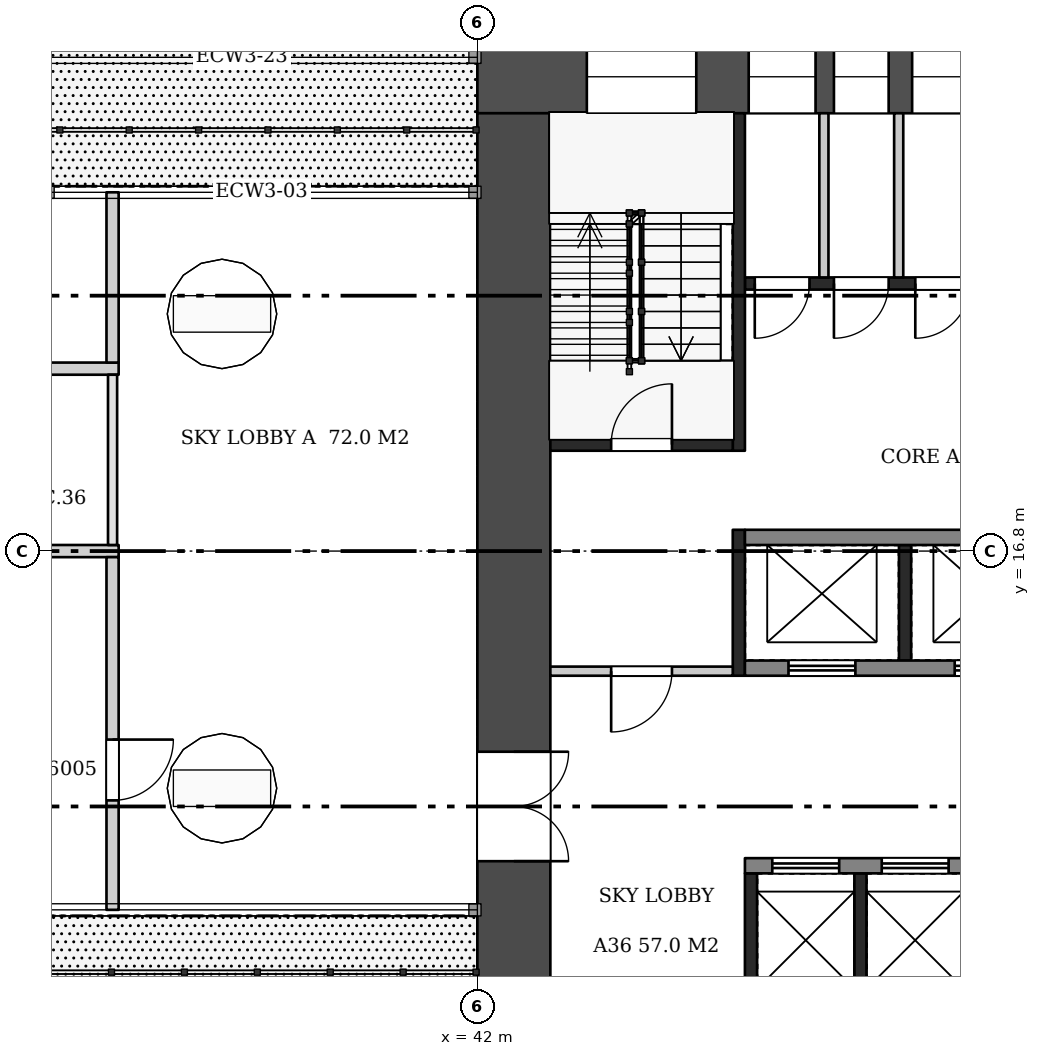
"""IFC4 building model, lengths in metres.
Left out: names, types, materials, properties, quantities, classifications, styles, units other than length and angle.
Written with IfcOpenShell. Run it as: python <this file> out.ifc"""

import sys

from ifc_helpers import new_model, si_unit, direction, frame, frame_2d, origin, place, context, subcontext, project, spatial, rectangle, extrude, element, fill, save


model = new_model("IFC4")
c1 = context("Model", 3, precision=1e-05, world=origin(), true_north=direction((0.0, 1.0)))
c2 = subcontext(c1, "Body", "Model", "MODEL_VIEW")
j1 = project(units=[si_unit("LENGTHUNIT", "METRE"), si_unit("PLANEANGLEUNIT", "RADIAN")], contexts=[c1])
p1 = place(None, origin())
s1 = spatial("IfcSite", under=j1, at=p1, CompositionType="ELEMENT")
p2 = place(p1, origin())
s2 = spatial("IfcBuilding", under=s1, at=p2, CompositionType="ELEMENT")
p3 = place(p2, frame((0.0, 0.0, 140.7)))
s3 = spatial("IfcBuildingStorey", under=s2, at=p3, CompositionType="ELEMENT", Elevation=140.7)
p4 = place(p3, frame((42.0, 24.6, 0.0), z_axis=(0.0, 0.0, 1.0), x_axis=(1.0, 0.0, 0.0)))
e1 = element("IfcWall", 1, at=p4, inside=s3, PredefinedType="SHEAR", context=c2, shape_type="SweptSolid", body=[
    extrude(rectangle(XDim=16.8, YDim=1.2, at=frame_2d((8.4, 0.0))), origin(), (0.0, 0.0, 1.0), 6.72),
])
p5 = place(p4, frame((1.8, 0.0, 0.5)))
e2 = element("IfcOpeningElement", 2, at=p5, cuts=e1, PredefinedType="OPENING", context=c2, shape_type="SweptSolid", body=[
    extrude(rectangle(XDim=1.8, YDim=2.4, at=frame_2d((0.9, 1.2))), frame((0.0, 0.61, 0.0), z_axis=(0.0, -1.0, 0.0), x_axis=(1.0, 0.0, 0.0)), (0.0, 0.0, 1.0), 1.22),
])
p6 = place(p4, frame((4.462, 0.0, 1.6)))
e3 = element("IfcOpeningElement", 3, at=p6, cuts=e1, PredefinedType="OPENING", context=c2, shape_type="SweptSolid", body=[
    extrude(rectangle(XDim=1.1, YDim=1.2, at=frame_2d((0.55, 0.6))), frame((0.0, 0.61, 0.0), z_axis=(0.0, -1.0, 0.0), x_axis=(1.0, 0.0, 0.0)), (0.0, 0.0, 1.0), 1.22),
])
p7 = place(p4, frame((5.864, 0.0, 1.6)))
e4 = element("IfcOpeningElement", 4, at=p7, cuts=e1, PredefinedType="OPENING", context=c2, shape_type="SweptSolid", body=[
    extrude(rectangle(XDim=0.9, YDim=1.2, at=frame_2d((0.45, 0.6))), frame((0.0, 0.61, 0.0), z_axis=(0.0, -1.0, 0.0), x_axis=(1.0, 0.0, 0.0)), (0.0, 0.0, 1.0), 1.22),
])
p8 = place(p4, frame((7.15, 0.0, 1.6)))
e5 = element("IfcOpeningElement", 5, at=p8, cuts=e1, PredefinedType="OPENING", context=c2, shape_type="SweptSolid", body=[
    extrude(rectangle(XDim=1.1, YDim=1.2, at=frame_2d((0.55, 0.6))), frame((0.0, 0.61, 0.0), z_axis=(0.0, -1.0, 0.0), x_axis=(1.0, 0.0, 0.0)), (0.0, 0.0, 1.0), 1.22),
])
p9 = place(p4, frame((12.65, 0.0, 0.6)))
e6 = element("IfcOpeningElement", 6, at=p9, cuts=e1, PredefinedType="OPENING", context=c2, shape_type="SweptSolid", body=[
    extrude(rectangle(XDim=1.0, YDim=2.1, at=frame_2d((0.5, 1.05))), frame((0.0, 0.61, 0.0), z_axis=(0.0, -1.0, 0.0), x_axis=(1.0, 0.0, 0.0)), (0.0, 0.0, 1.0), 1.22),
])
p10 = place(p4, frame((14.175, 0.0, 1.6)))
e7 = element("IfcOpeningElement", 7, at=p10, cuts=e1, PredefinedType="OPENING", context=c2, shape_type="SweptSolid", body=[
    extrude(rectangle(XDim=1.2, YDim=1.2, at=frame_2d((0.6, 0.6))), frame((0.0, 0.61, 0.0), z_axis=(0.0, -1.0, 0.0), x_axis=(1.0, 0.0, 0.0)), (0.0, 0.0, 1.0), 1.22),
])
p11 = place(p3, frame((42.6, 9.6, 0.0), z_axis=(0.0, 0.0, 1.0), x_axis=(0.0, 1.0, 0.0)))
e8 = element("IfcWall", 8, at=p11, inside=s3, PredefinedType="SHEAR", context=c2, shape_type="SweptSolid", body=[
    extrude(rectangle(XDim=14.4, YDim=1.2, at=frame_2d((7.2, 0.0))), origin(), (0.0, 0.0, 1.0), 6.72),
])
p12 = place(p11, frame((2.1, 0.0, 0.0)))
e9 = element("IfcOpeningElement", 9, at=p12, cuts=e8, PredefinedType="OPENING", context=c2, shape_type="SweptSolid", body=[
    extrude(rectangle(XDim=1.8, YDim=2.1, at=frame_2d((0.9, 1.05))), frame((0.0, 0.61, 0.0), z_axis=(0.0, -1.0, 0.0), x_axis=(1.0, 0.0, 0.0)), (0.0, 0.0, 1.0), 1.22),
])
for number, where, z_axis, x_axis in (
    (10, (46.5, 9.6, 0.0), (0.0, 0.0, 1.0), (0.0, 1.0, 0.0)),
    (11, (48.3, 9.6, 0.0), (0.0, 0.0, 1.0), (0.0, 1.0, 0.0)),
):
    element("IfcWall", number, at=place(p3, frame(where, z_axis=z_axis, x_axis=x_axis)), inside=s3, PredefinedType="SHEAR", context=c2, shape_type="SweptSolid", body=[
        extrude(rectangle(XDim=1.9, YDim=0.2, at=frame_2d((0.95, 0.0))), origin(), (0.0, 0.0, 1.0), 6.72),
    ])
p13 = place(p3, frame((46.4, 11.625, 0.0), z_axis=(0.0, 0.0, 1.0), x_axis=(1.0, 0.0, 0.0)))
e12 = element("IfcWall", 12, at=p13, inside=s3, PredefinedType="SHEAR", context=c2, shape_type="SweptSolid", body=[
    extrude(rectangle(XDim=8.0, YDim=0.25, at=frame_2d((4.0, 0.0))), origin(), (0.0, 0.0, 1.0), 6.72),
])
p14 = place(p13, frame((0.45, 0.0, 0.0)))
e13 = element("IfcOpeningElement", 13, at=p14, cuts=e12, PredefinedType="OPENING", context=c2, shape_type="SweptSolid", body=[
    extrude(rectangle(XDim=1.1, YDim=2.1, at=frame_2d((0.55, 1.05))), frame((0.0, 0.135, 0.0), z_axis=(0.0, -1.0, 0.0), x_axis=(1.0, 0.0, 0.0)), (0.0, 0.0, 1.0), 0.27),
])
p15 = place(p13, frame((2.25, 0.0, 0.0)))
e14 = element("IfcOpeningElement", 14, at=p15, cuts=e12, PredefinedType="OPENING", context=c2, shape_type="SweptSolid", body=[
    extrude(rectangle(XDim=1.1, YDim=2.1, at=frame_2d((0.55, 1.05))), frame((0.0, 0.135, 0.0), z_axis=(0.0, -1.0, 0.0), x_axis=(1.0, 0.0, 0.0)), (0.0, 0.0, 1.0), 0.27),
])
p16 = place(p13, frame((4.05, 0.0, 0.0)))
e15 = element("IfcOpeningElement", 15, at=p16, cuts=e12, PredefinedType="OPENING", context=c2, shape_type="SweptSolid", body=[
    extrude(rectangle(XDim=1.1, YDim=2.1, at=frame_2d((0.55, 1.05))), frame((0.0, 0.135, 0.0), z_axis=(0.0, -1.0, 0.0), x_axis=(1.0, 0.0, 0.0)), (0.0, 0.0, 1.0), 0.27),
])
p17 = place(p13, frame((5.581, 0.0, 0.0)))
e16 = element("IfcOpeningElement", 16, at=p17, cuts=e12, PredefinedType="OPENING", context=c2, shape_type="SweptSolid", body=[
    extrude(rectangle(XDim=0.9, YDim=2.1, at=frame_2d((0.45, 1.05))), frame((0.0, 0.135, 0.0), z_axis=(0.0, -1.0, 0.0), x_axis=(1.0, 0.0, 0.0)), (0.0, 0.0, 1.0), 0.27),
])
p18 = place(p13, frame((6.756, 0.0, 0.0)))
e17 = element("IfcOpeningElement", 17, at=p18, cuts=e12, PredefinedType="OPENING", context=c2, shape_type="SweptSolid", body=[
    extrude(rectangle(XDim=0.9, YDim=2.1, at=frame_2d((0.45, 1.05))), frame((0.0, 0.135, 0.0), z_axis=(0.0, -1.0, 0.0), x_axis=(1.0, 0.0, 0.0)), (0.0, 0.0, 1.0), 0.27),
])
p19 = place(p3, frame((49.033, 15.0, 0.0), z_axis=(0.0, 0.0, 1.0), x_axis=(0.0, 1.0, 0.0)))
e18 = element("IfcWall", 18, at=p19, inside=s3, PredefinedType="SHEAR", context=c2, shape_type="SweptSolid", body=[
    extrude(rectangle(XDim=1.9, YDim=0.2, at=frame_2d((0.95, 0.0))), origin(), (0.0, 0.0, 1.0), 6.72),
])
p20 = place(p3, frame((46.4, 14.875, 0.0), z_axis=(0.0, 0.0, 1.0), x_axis=(1.0, 0.0, 0.0)))
e19 = element("IfcWall", 19, at=p20, inside=s3, PredefinedType="SHEAR", context=c2, shape_type="SweptSolid", body=[
    extrude(rectangle(XDim=8.0, YDim=0.25, at=frame_2d((4.0, 0.0))), origin(), (0.0, 0.0, 1.0), 6.72),
])
p21 = place(p20, frame((0.717, 0.0, 0.0)))
e20 = element("IfcOpeningElement", 20, at=p21, cuts=e19, PredefinedType="OPENING", context=c2, shape_type="SweptSolid", body=[
    extrude(rectangle(XDim=1.1, YDim=2.1, at=frame_2d((0.55, 1.05))), frame((0.0, 0.135, 0.0), z_axis=(0.0, -1.0, 0.0), x_axis=(1.0, 0.0, 0.0)), (0.0, 0.0, 1.0), 0.27),
])
p22 = place(p20, frame((3.45, 0.0, 0.0)))
e21 = element("IfcOpeningElement", 21, at=p22, cuts=e19, PredefinedType="OPENING", context=c2, shape_type="SweptSolid", body=[
    extrude(rectangle(XDim=1.1, YDim=2.1, at=frame_2d((0.55, 1.05))), frame((0.0, 0.135, 0.0), z_axis=(0.0, -1.0, 0.0), x_axis=(1.0, 0.0, 0.0)), (0.0, 0.0, 1.0), 0.27),
])
p23 = place(p20, frame((6.183, 0.0, 0.0)))
e22 = element("IfcOpeningElement", 22, at=p23, cuts=e19, PredefinedType="OPENING", context=c2, shape_type="SweptSolid", body=[
    extrude(rectangle(XDim=1.1, YDim=2.1, at=frame_2d((0.55, 1.05))), frame((0.0, 0.135, 0.0), z_axis=(0.0, -1.0, 0.0), x_axis=(1.0, 0.0, 0.0)), (0.0, 0.0, 1.0), 0.27),
])
p24 = place(p3, frame((46.4, 17.025, 0.0), z_axis=(0.0, 0.0, 1.0), x_axis=(1.0, 0.0, 0.0)))
e23 = element("IfcWall", 23, at=p24, inside=s3, PredefinedType="SHEAR", context=c2, shape_type="SweptSolid", body=[
    extrude(rectangle(XDim=8.0, YDim=0.25, at=frame_2d((4.0, 0.0))), origin(), (0.0, 0.0, 1.0), 6.72),
])
for number, where, z_axis, x_axis in (
    (24, (47.699, 21.3, 0.0), (0.0, 0.0, 1.0), (0.0, 1.0, 0.0)),
    (25, (48.929, 21.3, 0.0), (0.0, 0.0, 1.0), (0.0, 1.0, 0.0)),
):
    element("IfcWall", number, at=place(p3, frame(where, z_axis=z_axis, x_axis=x_axis)), inside=s3, PredefinedType="PARTITIONING", context=c2, shape_type="SweptSolid", body=[
        extrude(rectangle(XDim=2.7, YDim=0.15, at=frame_2d((1.35, 0.0))), origin(), (0.0, 0.0, 1.0), 6.72),
    ])
p25 = place(p3, frame((46.4, 21.2, 0.0), z_axis=(0.0, 0.0, 1.0), x_axis=(1.0, 0.0, 0.0)))
e26 = element("IfcWall", 26, at=p25, inside=s3, PredefinedType="SHEAR", context=c2, shape_type="SweptSolid", body=[
    extrude(rectangle(XDim=8.0, YDim=0.2, at=frame_2d((4.0, 0.0))), origin(), (0.0, 0.0, 1.0), 6.72),
])
p26 = place(p25, frame((0.162, 0.0, 0.0)))
e27 = element("IfcOpeningElement", 27, at=p26, cuts=e26, PredefinedType="OPENING", context=c2, shape_type="SweptSolid", body=[
    extrude(rectangle(XDim=0.9, YDim=2.1, at=frame_2d((0.45, 1.05))), frame((0.0, 0.11, 0.0), z_axis=(0.0, -1.0, 0.0), x_axis=(1.0, 0.0, 0.0)), (0.0, 0.0, 1.0), 0.22),
])
p27 = place(p25, frame((1.464, 0.0, 0.0)))
e28 = element("IfcOpeningElement", 28, at=p27, cuts=e26, PredefinedType="OPENING", context=c2, shape_type="SweptSolid", body=[
    extrude(rectangle(XDim=0.9, YDim=2.1, at=frame_2d((0.45, 1.05))), frame((0.0, 0.11, 0.0), z_axis=(0.0, -1.0, 0.0), x_axis=(1.0, 0.0, 0.0)), (0.0, 0.0, 1.0), 0.22),
])
p28 = place(p25, frame((2.802, 0.0, 0.0)))
e29 = element("IfcOpeningElement", 29, at=p28, cuts=e26, PredefinedType="OPENING", context=c2, shape_type="SweptSolid", body=[
    extrude(rectangle(XDim=0.9, YDim=2.1, at=frame_2d((0.45, 1.05))), frame((0.0, 0.11, 0.0), z_axis=(0.0, -1.0, 0.0), x_axis=(1.0, 0.0, 0.0)), (0.0, 0.0, 1.0), 0.22),
])
p29 = place(p25, frame((4.55, 0.0, 0.0)))
e30 = element("IfcOpeningElement", 30, at=p29, cuts=e26, PredefinedType="OPENING", context=c2, shape_type="SweptSolid", body=[
    extrude(rectangle(XDim=1.1, YDim=2.1, at=frame_2d((0.55, 1.05))), frame((0.0, 0.11, 0.0), z_axis=(0.0, -1.0, 0.0), x_axis=(1.0, 0.0, 0.0)), (0.0, 0.0, 1.0), 0.22),
])
p30 = place(p25, frame((6.6, 0.0, 0.0)))
e31 = element("IfcOpeningElement", 31, at=p30, cuts=e26, PredefinedType="OPENING", context=c2, shape_type="SweptSolid", body=[
    extrude(rectangle(XDim=1.1, YDim=2.1, at=frame_2d((0.55, 1.05))), frame((0.0, 0.11, 0.0), z_axis=(0.0, -1.0, 0.0), x_axis=(1.0, 0.0, 0.0)), (0.0, 0.0, 1.0), 0.22),
])
p31 = place(p3, frame((46.3, 14.75, 0.0), z_axis=(0.0, 0.0, 1.0), x_axis=(0.0, 1.0, 0.0)))
e32 = element("IfcWall", 32, at=p31, inside=s3, PredefinedType="SHEAR", context=c2, shape_type="SweptSolid", body=[
    extrude(rectangle(XDim=2.4, YDim=0.2, at=frame_2d((1.2, 0.0))), origin(), (0.0, 0.0, 1.0), 6.72),
])
p32 = place(p3, frame((46.3, 18.45, 0.0), z_axis=(0.0, 0.0, 1.0), x_axis=(0.0, 1.0, 0.0)))
e33 = element("IfcWall", 33, at=p32, inside=s3, PredefinedType="SHEAR", context=c2, shape_type="SweptSolid", body=[
    extrude(rectangle(XDim=5.55, YDim=0.2, at=frame_2d((2.775, 0.0))), origin(), (0.0, 0.0, 1.0), 6.72),
])
p33 = place(p3, frame((43.2, 14.825, 0.0), z_axis=(0.0, 0.0, 1.0), x_axis=(1.0, 0.0, 0.0)))
e34 = element("IfcWall", 34, at=p33, inside=s3, PredefinedType="PARTITIONING", context=c2, shape_type="SweptSolid", body=[
    extrude(rectangle(XDim=3.0, YDim=0.15, at=frame_2d((1.5, 0.0))), origin(), (0.0, 0.0, 1.0), 6.72),
])
p34 = place(p33, frame((1.0, 0.0, 0.0)))
e35 = element("IfcOpeningElement", 35, at=p34, cuts=e34, PredefinedType="OPENING", context=c2, shape_type="SweptSolid", body=[
    extrude(rectangle(XDim=1.0, YDim=2.1, at=frame_2d((0.5, 1.05))), frame((0.0, 0.085, 0.0), z_axis=(0.0, -1.0, 0.0), x_axis=(1.0, 0.0, 0.0)), (0.0, 0.0, 1.0), 0.17),
])
p35 = place(p3, frame((43.2, 18.55, 0.0), z_axis=(0.0, 0.0, 1.0), x_axis=(1.0, 0.0, 0.0)))
e36 = element("IfcWall", 36, at=p35, inside=s3, PredefinedType="SHEAR", context=c2, shape_type="SweptSolid", body=[
    extrude(rectangle(XDim=3.0, YDim=0.2, at=frame_2d((1.5, 0.0))), origin(), (0.0, 0.0, 1.0), 6.72),
])
p36 = place(p35, frame((1.0, 0.0, 0.0)))
e37 = element("IfcOpeningElement", 37, at=p36, cuts=e36, PredefinedType="OPENING", context=c2, shape_type="SweptSolid", body=[
    extrude(rectangle(XDim=1.0, YDim=2.1, at=frame_2d((0.5, 1.05))), frame((0.0, 0.11, 0.0), z_axis=(0.0, -1.0, 0.0), x_axis=(1.0, 0.0, 0.0)), (0.0, 0.0, 1.0), 0.22),
])
p37 = place(p3, frame((31.2, 19.8, 0.0), z_axis=(0.0, 0.0, 1.0), x_axis=(1.0, 0.0, 0.0)))
e38 = element("IfcWall", 38, at=p37, inside=s3, PredefinedType="PARTITIONING", context=c2, shape_type="SweptSolid", body=[
    extrude(rectangle(XDim=4.9, YDim=0.2, at=frame_2d((2.45, 0.0))), origin(), (0.0, 0.0, 1.0), 6.72),
])
p38 = place(p37, frame((1.95, 0.0, 0.0)))
e39 = element("IfcOpeningElement", 39, at=p38, cuts=e38, PredefinedType="OPENING", context=c2, shape_type="SweptSolid", body=[
    extrude(rectangle(XDim=1.0, YDim=2.1, at=frame_2d((0.5, 1.05))), frame((0.0, 0.11, 0.0), z_axis=(0.0, -1.0, 0.0), x_axis=(1.0, 0.0, 0.0)), (0.0, 0.0, 1.0), 0.22),
])
p39 = place(p3, frame((34.15, 16.8, 0.0), z_axis=(0.0, 0.0, 1.0), x_axis=(1.0, 0.0, 0.0)))
e40 = element("IfcWall", 40, at=p39, inside=s3, PredefinedType="PARTITIONING", context=c2, shape_type="SweptSolid", body=[
    extrude(rectangle(XDim=1.95, YDim=0.2, at=frame_2d((0.975, 0.0))), origin(), (0.0, 0.0, 1.0), 6.72),
])
p40 = place(p3, frame((36.0, 10.9, 0.0), z_axis=(0.0, 0.0, 1.0), x_axis=(0.0, 1.0, 0.0)))
e41 = element("IfcWall", 41, at=p40, inside=s3, PredefinedType="PARTITIONING", context=c2, shape_type="SweptSolid", body=[
    extrude(rectangle(XDim=5.8, YDim=0.2, at=frame_2d((2.9, 0.0))), origin(), (0.0, 0.0, 1.0), 6.72),
])
p41 = place(p40, frame((1.8, 0.0, 0.0)))
e42 = element("IfcOpeningElement", 42, at=p41, cuts=e41, PredefinedType="OPENING", context=c2, shape_type="SweptSolid", body=[
    extrude(rectangle(XDim=1.0, YDim=2.1, at=frame_2d((0.5, 1.05))), frame((0.0, 0.11, 0.0), z_axis=(0.0, -1.0, 0.0), x_axis=(1.0, 0.0, 0.0)), (0.0, 0.0, 1.0), 0.22),
])
p42 = place(p3, frame((36.0, 16.9, 0.0), z_axis=(0.0, 0.0, 1.0), x_axis=(0.0, 1.0, 0.0)))
e43 = element("IfcWall", 43, at=p42, inside=s3, PredefinedType="PARTITIONING", context=c2, shape_type="SweptSolid", body=[
    extrude(rectangle(XDim=2.8, YDim=0.15, at=frame_2d((1.4, 0.0))), origin(), (0.0, 0.0, 1.0), 6.72),
])
p43 = place(p3, frame((36.0, 19.9, 0.0), z_axis=(0.0, 0.0, 1.0), x_axis=(0.0, 1.0, 0.0)))
e44 = element("IfcWall", 44, at=p43, inside=s3, PredefinedType="PARTITIONING", context=c2, shape_type="SweptSolid", body=[
    extrude(rectangle(XDim=2.8, YDim=0.2, at=frame_2d((1.4, 0.0))), origin(), (0.0, 0.0, 1.0), 6.72),
])
p44 = place(p12, frame((1.8, 0.0, 0.0), z_axis=(0.0, 0.0, 1.0), x_axis=(-1.0, 0.0, 0.0)))
e45 = element("IfcDoor", 45, at=p44, inside=s3, OperationType="DOUBLE_DOOR_SINGLE_SWING", PredefinedType="DOOR", context=c2, shape_type="SweptSolid", body=[
    extrude(rectangle(XDim=1.8, YDim=2.1, at=frame_2d((0.9, 1.05))), frame((0.0, 0.025, 0.0), z_axis=(0.0, -1.0, 0.0), x_axis=(1.0, 0.0, 0.0)), (0.0, 0.0, 1.0), 0.05),
])
fill(e9, e45)
p45 = place(p14, origin())
e46 = element("IfcDoor", 46, at=p45, inside=s3, OperationType="DOUBLE_DOOR_SLIDING", PredefinedType="DOOR", context=c2, shape_type="SweptSolid", body=[
    extrude(rectangle(XDim=1.1, YDim=2.1, at=frame_2d((0.55, 1.05))), frame((0.0, 0.025, 0.0), z_axis=(0.0, -1.0, 0.0), x_axis=(1.0, 0.0, 0.0)), (0.0, 0.0, 1.0), 0.05),
])
fill(e13, e46)
p46 = place(p15, origin())
e47 = element("IfcDoor", 47, at=p46, inside=s3, OperationType="DOUBLE_DOOR_SLIDING", PredefinedType="DOOR", context=c2, shape_type="SweptSolid", body=[
    extrude(rectangle(XDim=1.1, YDim=2.1, at=frame_2d((0.55, 1.05))), frame((0.0, 0.025, 0.0), z_axis=(0.0, -1.0, 0.0), x_axis=(1.0, 0.0, 0.0)), (0.0, 0.0, 1.0), 0.05),
])
fill(e14, e47)
p47 = place(p21, origin())
e48 = element("IfcDoor", 48, at=p47, inside=s3, OperationType="DOUBLE_DOOR_SLIDING", PredefinedType="DOOR", context=c2, shape_type="SweptSolid", body=[
    extrude(rectangle(XDim=1.1, YDim=2.1, at=frame_2d((0.55, 1.05))), frame((0.0, 0.025, 0.0), z_axis=(0.0, -1.0, 0.0), x_axis=(1.0, 0.0, 0.0)), (0.0, 0.0, 1.0), 0.05),
])
fill(e20, e48)
p48 = place(p22, origin())
e49 = element("IfcDoor", 49, at=p48, inside=s3, OperationType="DOUBLE_DOOR_SLIDING", PredefinedType="DOOR", context=c2, shape_type="SweptSolid", body=[
    extrude(rectangle(XDim=1.1, YDim=2.1, at=frame_2d((0.55, 1.05))), frame((0.0, 0.025, 0.0), z_axis=(0.0, -1.0, 0.0), x_axis=(1.0, 0.0, 0.0)), (0.0, 0.0, 1.0), 0.05),
])
fill(e21, e49)
p49 = place(p26, frame((0.9, 0.0, 0.0), z_axis=(0.0, 0.0, 1.0), x_axis=(-1.0, 0.0, 0.0)))
e50 = element("IfcDoor", 50, at=p49, inside=s3, OperationType="SINGLE_SWING_RIGHT", PredefinedType="DOOR", context=c2, shape_type="SweptSolid", body=[
    extrude(rectangle(XDim=0.9, YDim=2.1, at=frame_2d((0.45, 1.05))), frame((0.0, 0.025, 0.0), z_axis=(0.0, -1.0, 0.0), x_axis=(1.0, 0.0, 0.0)), (0.0, 0.0, 1.0), 0.05),
])
fill(e27, e50)
p50 = place(p27, frame((0.9, 0.0, 0.0), z_axis=(0.0, 0.0, 1.0), x_axis=(-1.0, 0.0, 0.0)))
e51 = element("IfcDoor", 51, at=p50, inside=s3, OperationType="SINGLE_SWING_RIGHT", PredefinedType="DOOR", context=c2, shape_type="SweptSolid", body=[
    extrude(rectangle(XDim=0.9, YDim=2.1, at=frame_2d((0.45, 1.05))), frame((0.0, 0.025, 0.0), z_axis=(0.0, -1.0, 0.0), x_axis=(1.0, 0.0, 0.0)), (0.0, 0.0, 1.0), 0.05),
])
fill(e28, e51)
p51 = place(p28, frame((0.9, 0.0, 0.0), z_axis=(0.0, 0.0, 1.0), x_axis=(-1.0, 0.0, 0.0)))
e52 = element("IfcDoor", 52, at=p51, inside=s3, OperationType="SINGLE_SWING_RIGHT", PredefinedType="DOOR", context=c2, shape_type="SweptSolid", body=[
    extrude(rectangle(XDim=0.9, YDim=2.1, at=frame_2d((0.45, 1.05))), frame((0.0, 0.025, 0.0), z_axis=(0.0, -1.0, 0.0), x_axis=(1.0, 0.0, 0.0)), (0.0, 0.0, 1.0), 0.05),
])
fill(e29, e52)
p52 = place(p34, frame((1.0, 0.0, 0.0), z_axis=(0.0, 0.0, 1.0), x_axis=(-1.0, 0.0, 0.0)))
e53 = element("IfcDoor", 53, at=p52, inside=s3, OperationType="SINGLE_SWING_RIGHT", PredefinedType="DOOR", context=c2, shape_type="SweptSolid", body=[
    extrude(rectangle(XDim=1.0, YDim=2.1, at=frame_2d((0.5, 1.05))), frame((0.0, 0.025, 0.0), z_axis=(0.0, -1.0, 0.0), x_axis=(1.0, 0.0, 0.0)), (0.0, 0.0, 1.0), 0.05),
])
fill(e35, e53)
p53 = place(p36, origin())
e54 = element("IfcDoor", 54, at=p53, inside=s3, OperationType="SINGLE_SWING_RIGHT", PredefinedType="DOOR", context=c2, shape_type="SweptSolid", body=[
    extrude(rectangle(XDim=1.0, YDim=2.1, at=frame_2d((0.5, 1.05))), frame((0.0, 0.025, 0.0), z_axis=(0.0, -1.0, 0.0), x_axis=(1.0, 0.0, 0.0)), (0.0, 0.0, 1.0), 0.05),
])
fill(e37, e54)
p54 = place(p5, origin())
e55 = element("IfcWindow", 55, at=p54, inside=s3, PartitioningType="SINGLE_PANEL", PredefinedType="WINDOW", context=c2, shape_type="SweptSolid", body=[
    extrude(rectangle(XDim=1.8, YDim=2.4, at=frame_2d((0.9, 1.2))), frame((0.0, 0.03, 0.0), z_axis=(0.0, -1.0, 0.0), x_axis=(1.0, 0.0, 0.0)), (0.0, 0.0, 1.0), 0.06),
])
fill(e2, e55)
p55 = place(p6, origin())
e56 = element("IfcWindow", 56, at=p55, inside=s3, PartitioningType="SINGLE_PANEL", PredefinedType="WINDOW", context=c2, shape_type="SweptSolid", body=[
    extrude(rectangle(XDim=1.1, YDim=1.2, at=frame_2d((0.55, 0.6))), frame((0.0, 0.03, 0.0), z_axis=(0.0, -1.0, 0.0), x_axis=(1.0, 0.0, 0.0)), (0.0, 0.0, 1.0), 0.06),
])
fill(e3, e56)
p56 = place(p7, origin())
e57 = element("IfcWindow", 57, at=p56, inside=s3, PartitioningType="SINGLE_PANEL", PredefinedType="WINDOW", context=c2, shape_type="SweptSolid", body=[
    extrude(rectangle(XDim=0.9, YDim=1.2, at=frame_2d((0.45, 0.6))), frame((0.0, 0.03, 0.0), z_axis=(0.0, -1.0, 0.0), x_axis=(1.0, 0.0, 0.0)), (0.0, 0.0, 1.0), 0.06),
])
fill(e4, e57)
p57 = place(p8, origin())
e58 = element("IfcWindow", 58, at=p57, inside=s3, PartitioningType="SINGLE_PANEL", PredefinedType="WINDOW", context=c2, shape_type="SweptSolid", body=[
    extrude(rectangle(XDim=1.1, YDim=1.2, at=frame_2d((0.55, 0.6))), frame((0.0, 0.03, 0.0), z_axis=(0.0, -1.0, 0.0), x_axis=(1.0, 0.0, 0.0)), (0.0, 0.0, 1.0), 0.06),
])
fill(e5, e58)
p58 = place(p41, frame((1.0, 0.0, 0.0), z_axis=(0.0, 0.0, 1.0), x_axis=(-1.0, 0.0, 0.0)))
e59 = element("IfcDoor", 59, at=p58, inside=s3, OperationType="SINGLE_SWING_LEFT", PredefinedType="DOOR", context=c2, shape_type="SweptSolid", body=[
    extrude(rectangle(XDim=1.0, YDim=2.1, at=frame_2d((0.5, 1.05))), frame((0.0, 0.025, 0.0), z_axis=(0.0, -1.0, 0.0), x_axis=(1.0, 0.0, 0.0)), (0.0, 0.0, 1.0), 0.05),
])
fill(e42, e59)
save(model, sys.argv[1])
